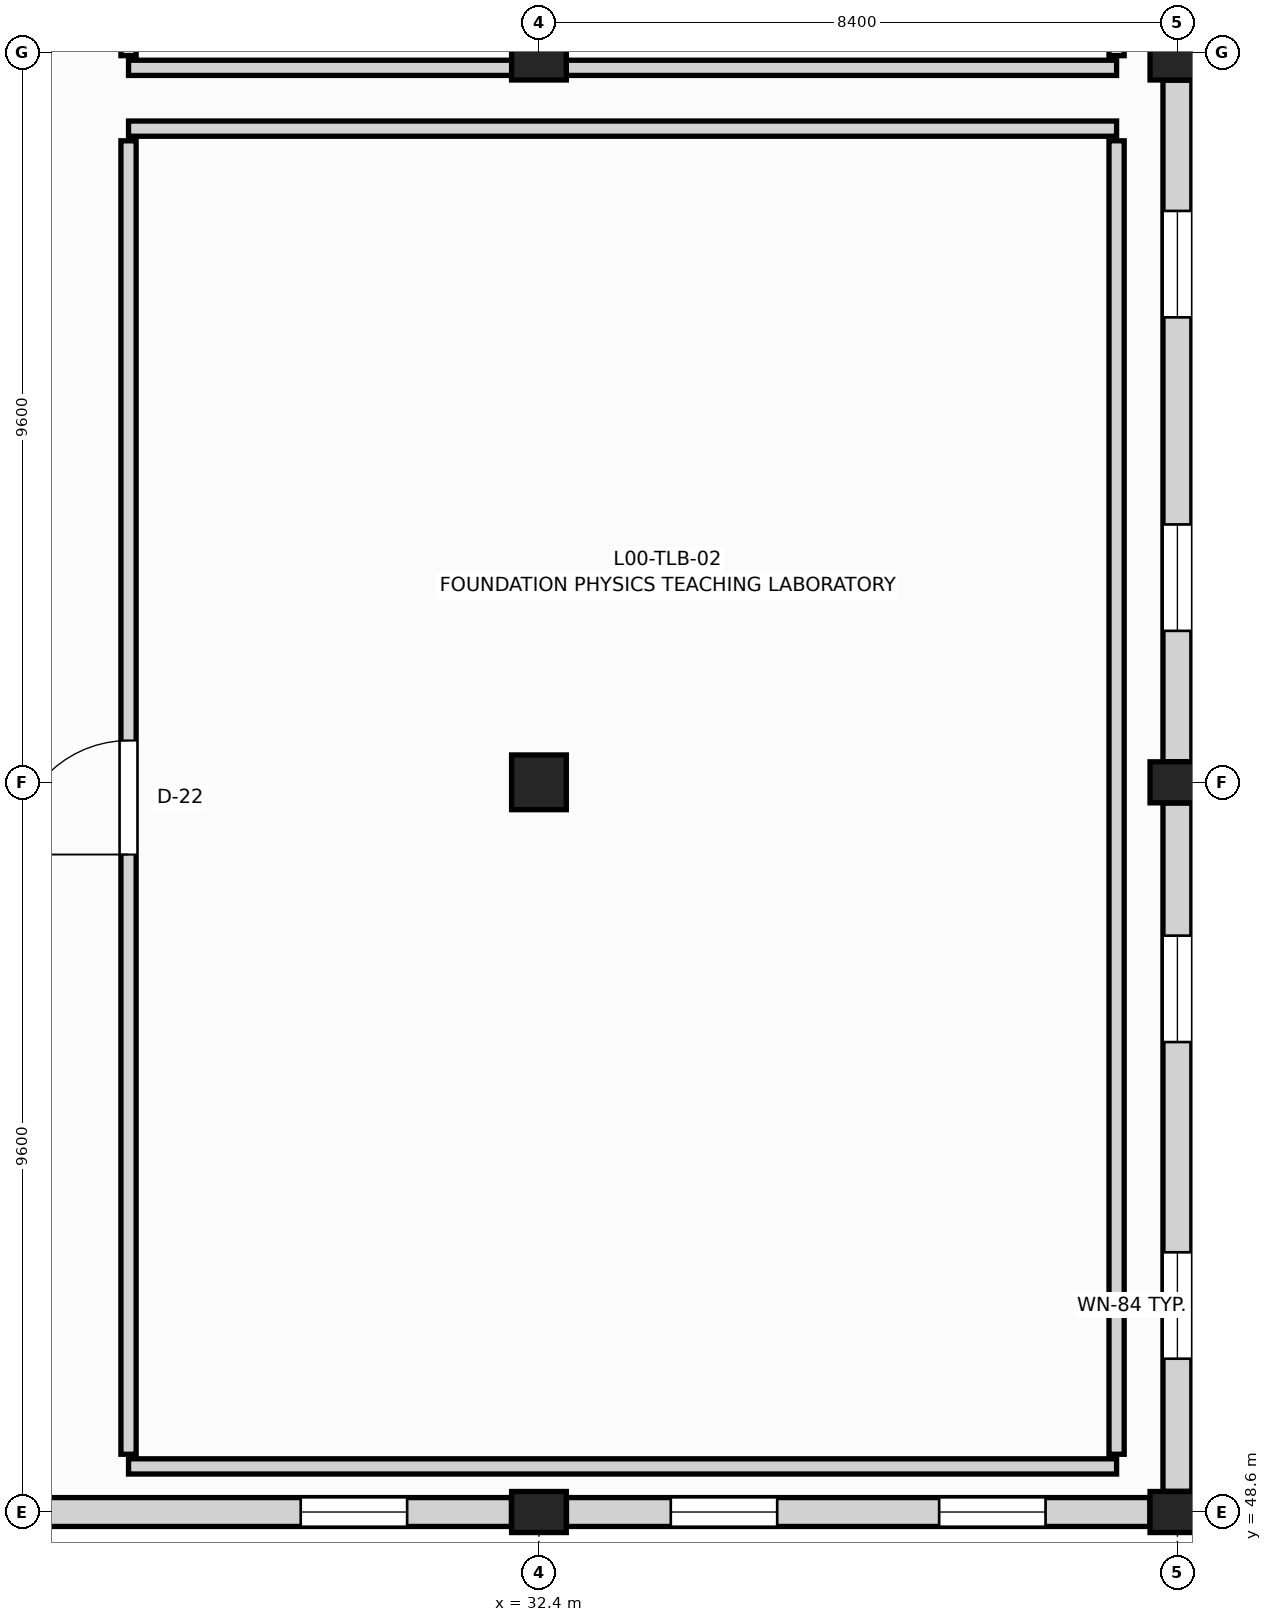
"""IFC4 building model, lengths in metres.
Left out: names, types, materials, properties, quantities, classifications, styles, units other than length and angle.
Written with IfcOpenShell. Run it as: python <this file> out.ifc"""

import sys

from ifc_helpers import new_model, si_unit, direction, frame, frame_2d, origin, origin_2d, place, context, subcontext, project, spatial, rectangle, extrude, element, fill, save


model = new_model("IFC4")
c1 = context("Model", 3, precision=1e-05, world=origin(), true_north=direction((0.0, 1.0)))
c2 = subcontext(c1, "Body", "Model", "MODEL_VIEW")
j1 = project(units=[si_unit("LENGTHUNIT", "METRE"), si_unit("PLANEANGLEUNIT", "RADIAN")], contexts=[c1])
p1 = place(None, origin())
s1 = spatial("IfcSite", under=j1, at=p1, CompositionType="ELEMENT")
p2 = place(p1, origin())
s2 = spatial("IfcBuilding", under=s1, at=p2, CompositionType="ELEMENT")
p3 = place(p2, origin())
s3 = spatial("IfcBuildingStorey", under=s2, at=p3, CompositionType="ELEMENT", Elevation=0.0)
p4 = place(p3, frame((32.4, 48.6, 0.0), z_axis=(0.0, 0.0, 1.0), x_axis=(1.0, 0.0, 0.0)))
e1 = element("IfcColumn", 1, at=p4, inside=s3, PredefinedType="COLUMN", context=c2, shape_type="SweptSolid", body=[
    extrude(rectangle(XDim=0.72, YDim=0.54, at=origin_2d()), origin(), (0.0, 0.0, 1.0), 5.08),
])
for number, where, z_axis, x_axis in (
    (2, (32.4, 58.2, 0.0), (0.0, 0.0, 1.0), (1.0, 0.0, 0.0)),
    (3, (32.4, 67.8, 0.0), (0.0, 0.0, 1.0), (1.0, 0.0, 0.0)),
):
    element("IfcColumn", number, at=place(p3, frame(where, z_axis=z_axis, x_axis=x_axis)), inside=s3, PredefinedType="COLUMN", context=c2, shape_type="SweptSolid", body=[
        extrude(rectangle(XDim=0.72, YDim=0.72, at=origin_2d()), origin(), (0.0, 0.0, 1.0), 5.08),
    ])
for number, where, z_axis, x_axis in (
    (4, (40.8, 48.6, 0.0), (0.0, 0.0, 1.0), (1.0, 0.0, 0.0)),
    (5, (40.8, 58.2, 0.0), (0.0, 0.0, 1.0), (1.0, 0.0, 0.0)),
):
    element("IfcColumn", number, at=place(p3, frame(where, z_axis=z_axis, x_axis=x_axis)), inside=s3, PredefinedType="COLUMN", context=c2, shape_type="SweptSolid", body=[
        extrude(rectangle(XDim=0.72, YDim=0.54, at=origin_2d()), origin(), (0.0, 0.0, 1.0), 5.08),
    ])
p5 = place(p3, frame((40.8, 67.8, 0.0), z_axis=(0.0, 0.0, 1.0), x_axis=(1.0, 0.0, 0.0)))
e6 = element("IfcColumn", 6, at=p5, inside=s3, PredefinedType="COLUMN", context=c2, shape_type="SweptSolid", body=[
    extrude(rectangle(XDim=0.72, YDim=0.72, at=origin_2d()), origin(), (0.0, 0.0, 1.0), 5.08),
])
p6 = place(p3, frame((40.8, 48.872, 0.0), z_axis=(0.0, 0.0, 1.0), x_axis=(0.0, 1.0, 0.0)))
e7 = element("IfcWall", 7, at=p6, inside=s3, PredefinedType="SOLIDWALL", context=c2, shape_type="SweptSolid", body=[
    extrude(rectangle(XDim=9.056, YDim=0.38, at=frame_2d((4.528, 0.0))), origin(), (0.0, 0.0, 1.0), 4.28),
])
p7 = place(p6, frame((1.745, 0.0, 0.85)))
e8 = element("IfcOpeningElement", 8, at=p7, cuts=e7, PredefinedType="OPENING", context=c2, shape_type="SweptSolid", body=[
    extrude(rectangle(XDim=1.4, YDim=1.65, at=frame_2d((0.7, 0.825))), frame((0.0, 0.2, 0.0), z_axis=(0.0, -1.0, 0.0), x_axis=(1.0, 0.0, 0.0)), (0.0, 0.0, 1.0), 0.4),
])
p8 = place(p6, frame((5.911, 0.0, 0.85)))
e9 = element("IfcOpeningElement", 9, at=p8, cuts=e7, PredefinedType="OPENING", context=c2, shape_type="SweptSolid", body=[
    extrude(rectangle(XDim=1.4, YDim=1.65, at=frame_2d((0.7, 0.825))), frame((0.0, 0.2, 0.0), z_axis=(0.0, -1.0, 0.0), x_axis=(1.0, 0.0, 0.0)), (0.0, 0.0, 1.0), 0.4),
])
p9 = place(p3, frame((40.8, 58.472, 0.0), z_axis=(0.0, 0.0, 1.0), x_axis=(0.0, 1.0, 0.0)))
e10 = element("IfcWall", 10, at=p9, inside=s3, PredefinedType="SOLIDWALL", context=c2, shape_type="SweptSolid", body=[
    extrude(rectangle(XDim=8.966, YDim=0.38, at=frame_2d((4.483, 0.0))), origin(), (0.0, 0.0, 1.0), 4.28),
])
p10 = place(p9, frame((1.721, 0.0, 0.85)))
e11 = element("IfcOpeningElement", 11, at=p10, cuts=e10, PredefinedType="OPENING", context=c2, shape_type="SweptSolid", body=[
    extrude(rectangle(XDim=1.4, YDim=1.65, at=frame_2d((0.7, 0.825))), frame((0.0, 0.2, 0.0), z_axis=(0.0, -1.0, 0.0), x_axis=(1.0, 0.0, 0.0)), (0.0, 0.0, 1.0), 0.4),
])
p11 = place(p9, frame((5.845, 0.0, 0.85)))
e12 = element("IfcOpeningElement", 12, at=p11, cuts=e10, PredefinedType="OPENING", context=c2, shape_type="SweptSolid", body=[
    extrude(rectangle(XDim=1.4, YDim=1.65, at=frame_2d((0.7, 0.825))), frame((0.0, 0.2, 0.0), z_axis=(0.0, -1.0, 0.0), x_axis=(1.0, 0.0, 0.0)), (0.0, 0.0, 1.0), 0.4),
])
p12 = place(p3, frame((24.362, 48.6, 0.0), z_axis=(0.0, 0.0, 1.0), x_axis=(1.0, 0.0, 0.0)))
e13 = element("IfcWall", 13, at=p12, inside=s3, PredefinedType="SOLIDWALL", context=c2, shape_type="SweptSolid", body=[
    extrude(rectangle(XDim=7.676, YDim=0.38, at=frame_2d((3.838, 0.0))), origin(), (0.0, 0.0, 1.0), 4.28),
])
p13 = place(p12, frame((4.904, 0.0, 0.85)))
e14 = element("IfcOpeningElement", 14, at=p13, cuts=e13, PredefinedType="OPENING", context=c2, shape_type="SweptSolid", body=[
    extrude(rectangle(XDim=1.4, YDim=1.65, at=frame_2d((0.7, 0.825))), frame((0.0, 0.2, 0.0), z_axis=(0.0, -1.0, 0.0), x_axis=(1.0, 0.0, 0.0)), (0.0, 0.0, 1.0), 0.4),
])
p14 = place(p3, frame((32.762, 48.6, 0.0), z_axis=(0.0, 0.0, 1.0), x_axis=(1.0, 0.0, 0.0)))
e15 = element("IfcWall", 15, at=p14, inside=s3, PredefinedType="SOLIDWALL", context=c2, shape_type="SweptSolid", body=[
    extrude(rectangle(XDim=7.676, YDim=0.38, at=frame_2d((3.838, 0.0))), origin(), (0.0, 0.0, 1.0), 4.28),
])
p15 = place(p14, frame((1.373, 0.0, 0.85)))
e16 = element("IfcOpeningElement", 16, at=p15, cuts=e15, PredefinedType="OPENING", context=c2, shape_type="SweptSolid", body=[
    extrude(rectangle(XDim=1.4, YDim=1.65, at=frame_2d((0.7, 0.825))), frame((0.0, 0.2, 0.0), z_axis=(0.0, -1.0, 0.0), x_axis=(1.0, 0.0, 0.0)), (0.0, 0.0, 1.0), 0.4),
])
p16 = place(p14, frame((4.904, 0.0, 0.85)))
e17 = element("IfcOpeningElement", 17, at=p16, cuts=e15, PredefinedType="OPENING", context=c2, shape_type="SweptSolid", body=[
    extrude(rectangle(XDim=1.4, YDim=1.65, at=frame_2d((0.7, 0.825))), frame((0.0, 0.2, 0.0), z_axis=(0.0, -1.0, 0.0), x_axis=(1.0, 0.0, 0.0)), (0.0, 0.0, 1.0), 0.4),
])
for number, where, z_axis, x_axis in (
    (18, (27.0, 49.2, 0.0), (0.0, 0.0, 1.0), (1.0, 0.0, 0.0)),
    (19, (27.0, 66.8, 0.0), (0.0, 0.0, 1.0), (1.0, 0.0, 0.0)),
):
    element("IfcWall", number, at=place(p3, frame(where, z_axis=z_axis, x_axis=x_axis)), inside=s3, PredefinedType="PARTITIONING", context=c2, shape_type="SweptSolid", body=[
        extrude(rectangle(XDim=13.0, YDim=0.2, at=frame_2d((6.5, 0.0))), origin(), (0.0, 0.0, 1.0), 4.12),
    ])
p17 = place(p3, frame((27.0, 49.36, 0.0), z_axis=(0.0, 0.0, 1.0), x_axis=(0.0, 1.0, 0.0)))
e20 = element("IfcWall", 20, at=p17, inside=s3, PredefinedType="PARTITIONING", context=c2, shape_type="SweptSolid", body=[
    extrude(rectangle(XDim=17.28, YDim=0.2, at=frame_2d((8.64, 0.0))), origin(), (0.0, 0.0, 1.0), 4.12),
])
p18 = place(p17, frame((7.89, 0.0, 0.0)))
e21 = element("IfcOpeningElement", 21, at=p18, cuts=e20, PredefinedType="OPENING", context=c2, shape_type="SweptSolid", body=[
    extrude(rectangle(XDim=1.5, YDim=2.2, at=frame_2d((0.75, 1.1))), frame((0.0, 0.11, 0.0), z_axis=(0.0, -1.0, 0.0), x_axis=(1.0, 0.0, 0.0)), (0.0, 0.0, 1.0), 0.22),
])
p19 = place(p3, frame((40.0, 49.36, 0.0), z_axis=(0.0, 0.0, 1.0), x_axis=(0.0, 1.0, 0.0)))
e22 = element("IfcWall", 22, at=p19, inside=s3, PredefinedType="PARTITIONING", context=c2, shape_type="SweptSolid", body=[
    extrude(rectangle(XDim=17.28, YDim=0.2, at=frame_2d((8.64, 0.0))), origin(), (0.0, 0.0, 1.0), 4.12),
])
p20 = place(p3, frame((27.0, 67.6, 0.0), z_axis=(0.0, 0.0, 1.0), x_axis=(1.0, 0.0, 0.0)))
e23 = element("IfcWall", 23, at=p20, inside=s3, PredefinedType="PARTITIONING", context=c2, shape_type="SweptSolid", body=[
    extrude(rectangle(XDim=13.0, YDim=0.2, at=frame_2d((6.5, 0.0))), origin(), (0.0, 0.0, 1.0), 4.12),
])
p21 = place(p3, frame((27.0, 67.76, 0.0), z_axis=(0.0, 0.0, 1.0), x_axis=(0.0, 1.0, 0.0)))
e24 = element("IfcWall", 24, at=p21, inside=s3, PredefinedType="PARTITIONING", context=c2, shape_type="SweptSolid", body=[
    extrude(rectangle(XDim=18.28, YDim=0.2, at=frame_2d((9.14, 0.0))), origin(), (0.0, 0.0, 1.0), 4.12),
])
p22 = place(p21, frame((8.39, 0.0, 0.0)))
e25 = element("IfcOpeningElement", 25, at=p22, cuts=e24, PredefinedType="OPENING", context=c2, shape_type="SweptSolid", body=[
    extrude(rectangle(XDim=1.5, YDim=2.2, at=frame_2d((0.75, 1.1))), frame((0.0, 0.11, 0.0), z_axis=(0.0, -1.0, 0.0), x_axis=(1.0, 0.0, 0.0)), (0.0, 0.0, 1.0), 0.22),
])
p23 = place(p3, frame((40.0, 67.76, 0.0), z_axis=(0.0, 0.0, 1.0), x_axis=(0.0, 1.0, 0.0)))
e26 = element("IfcWall", 26, at=p23, inside=s3, PredefinedType="PARTITIONING", context=c2, shape_type="SweptSolid", body=[
    extrude(rectangle(XDim=18.28, YDim=0.2, at=frame_2d((9.14, 0.0))), origin(), (0.0, 0.0, 1.0), 4.12),
])
p24 = place(p7, origin())
e27 = element("IfcWindow", 27, at=p24, inside=s3, PartitioningType="SINGLE_PANEL", PredefinedType="WINDOW", context=c2, shape_type="SweptSolid", body=[
    extrude(rectangle(XDim=1.4, YDim=1.65, at=frame_2d((0.7, 0.825))), frame((0.0, 0.03, 0.0), z_axis=(0.0, -1.0, 0.0), x_axis=(1.0, 0.0, 0.0)), (0.0, 0.0, 1.0), 0.06),
])
fill(e8, e27)
p25 = place(p8, origin())
e28 = element("IfcWindow", 28, at=p25, inside=s3, PartitioningType="SINGLE_PANEL", PredefinedType="WINDOW", context=c2, shape_type="SweptSolid", body=[
    extrude(rectangle(XDim=1.4, YDim=1.65, at=frame_2d((0.7, 0.825))), frame((0.0, 0.03, 0.0), z_axis=(0.0, -1.0, 0.0), x_axis=(1.0, 0.0, 0.0)), (0.0, 0.0, 1.0), 0.06),
])
fill(e9, e28)
p26 = place(p10, origin())
e29 = element("IfcWindow", 29, at=p26, inside=s3, PartitioningType="SINGLE_PANEL", PredefinedType="WINDOW", context=c2, shape_type="SweptSolid", body=[
    extrude(rectangle(XDim=1.4, YDim=1.65, at=frame_2d((0.7, 0.825))), frame((0.0, 0.03, 0.0), z_axis=(0.0, -1.0, 0.0), x_axis=(1.0, 0.0, 0.0)), (0.0, 0.0, 1.0), 0.06),
])
fill(e11, e29)
p27 = place(p11, origin())
e30 = element("IfcWindow", 30, at=p27, inside=s3, PartitioningType="SINGLE_PANEL", PredefinedType="WINDOW", context=c2, shape_type="SweptSolid", body=[
    extrude(rectangle(XDim=1.4, YDim=1.65, at=frame_2d((0.7, 0.825))), frame((0.0, 0.03, 0.0), z_axis=(0.0, -1.0, 0.0), x_axis=(1.0, 0.0, 0.0)), (0.0, 0.0, 1.0), 0.06),
])
fill(e12, e30)
p28 = place(p13, origin())
e31 = element("IfcWindow", 31, at=p28, inside=s3, PartitioningType="SINGLE_PANEL", PredefinedType="WINDOW", context=c2, shape_type="SweptSolid", body=[
    extrude(rectangle(XDim=1.4, YDim=1.65, at=frame_2d((0.7, 0.825))), frame((0.0, 0.03, 0.0), z_axis=(0.0, -1.0, 0.0), x_axis=(1.0, 0.0, 0.0)), (0.0, 0.0, 1.0), 0.06),
])
fill(e14, e31)
p29 = place(p15, origin())
e32 = element("IfcWindow", 32, at=p29, inside=s3, PartitioningType="SINGLE_PANEL", PredefinedType="WINDOW", context=c2, shape_type="SweptSolid", body=[
    extrude(rectangle(XDim=1.4, YDim=1.65, at=frame_2d((0.7, 0.825))), frame((0.0, 0.03, 0.0), z_axis=(0.0, -1.0, 0.0), x_axis=(1.0, 0.0, 0.0)), (0.0, 0.0, 1.0), 0.06),
])
fill(e16, e32)
p30 = place(p16, origin())
e33 = element("IfcWindow", 33, at=p30, inside=s3, PartitioningType="SINGLE_PANEL", PredefinedType="WINDOW", context=c2, shape_type="SweptSolid", body=[
    extrude(rectangle(XDim=1.4, YDim=1.65, at=frame_2d((0.7, 0.825))), frame((0.0, 0.03, 0.0), z_axis=(0.0, -1.0, 0.0), x_axis=(1.0, 0.0, 0.0)), (0.0, 0.0, 1.0), 0.06),
])
fill(e17, e33)
p31 = place(p18, origin())
e34 = element("IfcDoor", 34, at=p31, inside=s3, OperationType="SINGLE_SWING_LEFT", PredefinedType="DOOR", context=c2, shape_type="SweptSolid", body=[
    extrude(rectangle(XDim=1.5, YDim=2.2, at=frame_2d((0.75, 1.1))), frame((0.0, 0.025, 0.0), z_axis=(0.0, -1.0, 0.0), x_axis=(1.0, 0.0, 0.0)), (0.0, 0.0, 1.0), 0.05),
])
fill(e21, e34)
save(model, sys.argv[1])
